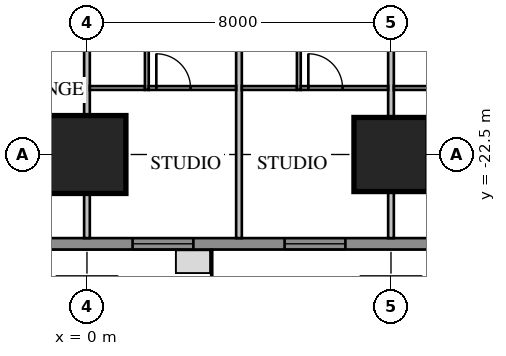
"""IFC4 building model, lengths in metres.
Left out: names, types, materials, properties, quantities, classifications, styles, units other than length and angle.
Written with IfcOpenShell. Run it as: python <this file> out.ifc"""

import sys

from ifc_helpers import new_model, si_unit, direction, frame, frame_2d, origin, origin_2d, place, context, subcontext, project, spatial, rectangle, extrude, element, fill, save


model = new_model("IFC4")
c1 = context("Model", 3, precision=1e-05, world=origin(), true_north=direction((0.0, 1.0)))
c2 = subcontext(c1, "Body", "Model", "MODEL_VIEW")
j1 = project(units=[si_unit("LENGTHUNIT", "METRE"), si_unit("PLANEANGLEUNIT", "RADIAN")], contexts=[c1])
p1 = place(None, origin())
s1 = spatial("IfcSite", under=j1, at=p1, CompositionType="ELEMENT")
p2 = place(p1, origin())
s2 = spatial("IfcBuilding", under=s1, at=p2, CompositionType="ELEMENT")
p3 = place(p2, frame((0.0, 0.0, 27.55)))
s3 = spatial("IfcBuildingStorey", under=s2, at=p3, CompositionType="ELEMENT", Elevation=27.55)
p4 = place(p3, frame((0.0, -22.5, 0.0), z_axis=(0.0, 0.0, 1.0), x_axis=(1.0, 0.0, 0.0)))
e1 = element("IfcColumn", 1, at=p4, inside=s3, PredefinedType="COLUMN", context=c2, shape_type="SweptSolid", body=[
    extrude(rectangle(XDim=2.05, YDim=2.05, at=origin_2d()), origin(), (0.0, 0.0, 1.0), 3.85),
])
p5 = place(p3, frame((8.0, -22.5, 0.0), z_axis=(0.0, 0.0, 1.0), x_axis=(1.0, 0.0, 0.0)))
e2 = element("IfcColumn", 2, at=p5, inside=s3, PredefinedType="COLUMN", context=c2, shape_type="SweptSolid", body=[
    extrude(rectangle(XDim=1.95, YDim=1.95, at=origin_2d()), origin(), (0.0, 0.0, 1.0), 3.85),
])
p6 = place(p3, frame((-16.0, -24.85, 0.0), z_axis=(0.0, 0.0, 1.0), x_axis=(1.0, 0.0, 0.0)))
e3 = element("IfcWall", 3, at=p6, inside=s3, PredefinedType="SOLIDWALL", context=c2, shape_type="SweptSolid", body=[
    extrude(rectangle(XDim=32.0, YDim=0.3, at=frame_2d((16.0, 0.0))), origin(), (0.0, 0.0, 1.0), 3.65),
])
p7 = place(p6, frame((1.2, 0.0, 0.75)))
e4 = element("IfcOpeningElement", 4, at=p7, cuts=e3, PredefinedType="OPENING", context=c2, shape_type="SweptSolid", body=[
    extrude(rectangle(XDim=1.6, YDim=1.8, at=frame_2d((0.8, 0.9))), frame((0.0, 0.17, 0.0), z_axis=(0.0, -1.0, 0.0), x_axis=(1.0, 0.0, 0.0)), (0.0, 0.0, 1.0), 0.34),
])
p8 = place(p6, frame((5.2, 0.0, 0.75)))
e5 = element("IfcOpeningElement", 5, at=p8, cuts=e3, PredefinedType="OPENING", context=c2, shape_type="SweptSolid", body=[
    extrude(rectangle(XDim=1.6, YDim=1.8, at=frame_2d((0.8, 0.9))), frame((0.0, 0.17, 0.0), z_axis=(0.0, -1.0, 0.0), x_axis=(1.0, 0.0, 0.0)), (0.0, 0.0, 1.0), 0.34),
])
p9 = place(p6, frame((17.2, 0.0, 0.75)))
e6 = element("IfcOpeningElement", 6, at=p9, cuts=e3, PredefinedType="OPENING", context=c2, shape_type="SweptSolid", body=[
    extrude(rectangle(XDim=1.6, YDim=1.8, at=frame_2d((0.8, 0.9))), frame((0.0, 0.17, 0.0), z_axis=(0.0, -1.0, 0.0), x_axis=(1.0, 0.0, 0.0)), (0.0, 0.0, 1.0), 0.34),
])
p10 = place(p6, frame((21.2, 0.0, 0.75)))
e7 = element("IfcOpeningElement", 7, at=p10, cuts=e3, PredefinedType="OPENING", context=c2, shape_type="SweptSolid", body=[
    extrude(rectangle(XDim=1.6, YDim=1.8, at=frame_2d((0.8, 0.9))), frame((0.0, 0.17, 0.0), z_axis=(0.0, -1.0, 0.0), x_axis=(1.0, 0.0, 0.0)), (0.0, 0.0, 1.0), 0.34),
])
p11 = place(p6, frame((25.2, 0.0, 0.75)))
e8 = element("IfcOpeningElement", 8, at=p11, cuts=e3, PredefinedType="OPENING", context=c2, shape_type="SweptSolid", body=[
    extrude(rectangle(XDim=1.6, YDim=1.8, at=frame_2d((0.8, 0.9))), frame((0.0, 0.17, 0.0), z_axis=(0.0, -1.0, 0.0), x_axis=(1.0, 0.0, 0.0)), (0.0, 0.0, 1.0), 0.34),
])
p12 = place(p6, frame((29.2, 0.0, 0.75)))
e9 = element("IfcOpeningElement", 9, at=p12, cuts=e3, PredefinedType="OPENING", context=c2, shape_type="SweptSolid", body=[
    extrude(rectangle(XDim=1.6, YDim=1.8, at=frame_2d((0.8, 0.9))), frame((0.0, 0.17, 0.0), z_axis=(0.0, -1.0, 0.0), x_axis=(1.0, 0.0, 0.0)), (0.0, 0.0, 1.0), 0.34),
])
p13 = place(p6, frame((8.8, 0.0, 0.75)))
e10 = element("IfcOpeningElement", 10, at=p13, cuts=e3, PredefinedType="OPENING", context=c2, shape_type="SweptSolid", body=[
    extrude(rectangle(XDim=2.4, YDim=1.8, at=frame_2d((1.2, 0.9))), frame((0.0, 0.17, 0.0), z_axis=(0.0, -1.0, 0.0), x_axis=(1.0, 0.0, 0.0)), (0.0, 0.0, 1.0), 0.34),
])
p14 = place(p6, frame((13.812, 0.0, 0.0)))
e11 = element("IfcOpeningElement", 11, at=p14, cuts=e3, PredefinedType="OPENING", context=c2, shape_type="SweptSolid", body=[
    extrude(rectangle(XDim=1.0, YDim=2.4, at=frame_2d((0.5, 1.2))), frame((0.0, 0.17, 0.0), z_axis=(0.0, -1.0, 0.0), x_axis=(1.0, 0.0, 0.0)), (0.0, 0.0, 1.0), 0.34),
])
p15 = place(p3, frame((0.0, -18.1, 0.0), z_axis=(0.0, 0.0, 1.0), x_axis=(0.0, -1.0, 0.0)))
e12 = element("IfcWall", 12, at=p15, inside=s3, PredefinedType="PARTITIONING", context=c2, shape_type="SweptSolid", body=[
    extrude(rectangle(XDim=6.6, YDim=0.15, at=frame_2d((3.3, 0.0))), origin(), (0.0, 0.0, 1.0), 2.809),
])
for number, where, z_axis, x_axis in (
    (13, (4.0, -18.1, 0.0), (0.0, 0.0, 1.0), (0.0, -1.0, 0.0)),
    (14, (8.0, -18.1, 0.0), (0.0, 0.0, 1.0), (0.0, -1.0, 0.0)),
):
    element("IfcWall", number, at=place(p3, frame(where, z_axis=z_axis, x_axis=x_axis)), inside=s3, PredefinedType="PARTITIONING", context=c2, shape_type="SweptSolid", body=[
        extrude(rectangle(XDim=6.6, YDim=0.15, at=frame_2d((3.3, 0.0))), origin(), (0.0, 0.0, 1.0), 3.65),
    ])
p16 = place(p3, frame((1.575, -18.1, 0.0), z_axis=(0.0, 0.0, 1.0), x_axis=(0.0, -1.0, 0.0)))
e15 = element("IfcWall", 15, at=p16, inside=s3, PredefinedType="PARTITIONING", context=c2, shape_type="SweptSolid", body=[
    extrude(rectangle(XDim=2.7, YDim=0.1, at=frame_2d((1.35, 0.0))), origin(), (0.0, 0.0, 1.0), 3.65),
])
p17 = place(p16, frame((0.55, 0.0, 0.0)))
e16 = element("IfcOpeningElement", 16, at=p17, cuts=e15, PredefinedType="OPENING", context=c2, shape_type="SweptSolid", body=[
    extrude(rectangle(XDim=0.8, YDim=2.1, at=frame_2d((0.4, 1.05))), frame((0.0, 0.07, 0.0), z_axis=(0.0, -1.0, 0.0), x_axis=(1.0, 0.0, 0.0)), (0.0, 0.0, 1.0), 0.14),
])
p18 = place(p3, frame((0.075, -20.75, 0.0), z_axis=(0.0, 0.0, 1.0), x_axis=(1.0, 0.0, 0.0)))
e17 = element("IfcWall", 17, at=p18, inside=s3, PredefinedType="PARTITIONING", context=c2, shape_type="SweptSolid", body=[
    extrude(rectangle(XDim=1.45, YDim=0.1, at=frame_2d((0.725, 0.0))), origin(), (0.0, 0.0, 1.0), 3.65),
])
p19 = place(p3, frame((5.575, -18.1, 0.0), z_axis=(0.0, 0.0, 1.0), x_axis=(0.0, -1.0, 0.0)))
e18 = element("IfcWall", 18, at=p19, inside=s3, PredefinedType="PARTITIONING", context=c2, shape_type="SweptSolid", body=[
    extrude(rectangle(XDim=2.7, YDim=0.1, at=frame_2d((1.35, 0.0))), origin(), (0.0, 0.0, 1.0), 3.65),
])
p20 = place(p19, frame((0.55, 0.0, 0.0)))
e19 = element("IfcOpeningElement", 19, at=p20, cuts=e18, PredefinedType="OPENING", context=c2, shape_type="SweptSolid", body=[
    extrude(rectangle(XDim=0.8, YDim=2.1, at=frame_2d((0.4, 1.05))), frame((0.0, 0.07, 0.0), z_axis=(0.0, -1.0, 0.0), x_axis=(1.0, 0.0, 0.0)), (0.0, 0.0, 1.0), 0.14),
])
for number, where, z_axis, x_axis in (
    (20, (4.075, -20.75, 0.0), (0.0, 0.0, 1.0), (1.0, 0.0, 0.0)),
    (21, (8.075, -20.75, 0.0), (0.0, 0.0, 1.0), (1.0, 0.0, 0.0)),
):
    element("IfcWall", number, at=place(p3, frame(where, z_axis=z_axis, x_axis=x_axis)), inside=s3, PredefinedType="PARTITIONING", context=c2, shape_type="SweptSolid", body=[
        extrude(rectangle(XDim=1.45, YDim=0.1, at=frame_2d((0.725, 0.0))), origin(), (0.0, 0.0, 1.0), 3.65),
    ])
p21 = place(p3, frame((1.625, -20.75, 0.0), z_axis=(0.0, 0.0, 1.0), x_axis=(1.0, 0.0, 0.0)))
e22 = element("IfcWall", 22, at=p21, inside=s3, PredefinedType="PARTITIONING", context=c2, shape_type="SweptSolid", body=[
    extrude(rectangle(XDim=2.3, YDim=0.1, at=frame_2d((1.15, 0.0))), origin(), (0.0, 0.0, 1.0), 3.65),
])
p22 = place(p21, frame((0.2, 0.0, 0.0)))
e23 = element("IfcOpeningElement", 23, at=p22, cuts=e22, PredefinedType="OPENING", context=c2, shape_type="SweptSolid", body=[
    extrude(rectangle(XDim=0.9, YDim=2.1, at=frame_2d((0.45, 1.05))), frame((0.0, 0.07, 0.0), z_axis=(0.0, -1.0, 0.0), x_axis=(1.0, 0.0, 0.0)), (0.0, 0.0, 1.0), 0.14),
])
p23 = place(p3, frame((5.625, -20.75, 0.0), z_axis=(0.0, 0.0, 1.0), x_axis=(1.0, 0.0, 0.0)))
e24 = element("IfcWall", 24, at=p23, inside=s3, PredefinedType="PARTITIONING", context=c2, shape_type="SweptSolid", body=[
    extrude(rectangle(XDim=2.3, YDim=0.1, at=frame_2d((1.15, 0.0))), origin(), (0.0, 0.0, 1.0), 3.65),
])
p24 = place(p23, frame((0.2, 0.0, 0.0)))
e25 = element("IfcOpeningElement", 25, at=p24, cuts=e24, PredefinedType="OPENING", context=c2, shape_type="SweptSolid", body=[
    extrude(rectangle(XDim=0.9, YDim=2.1, at=frame_2d((0.45, 1.05))), frame((0.0, 0.07, 0.0), z_axis=(0.0, -1.0, 0.0), x_axis=(1.0, 0.0, 0.0)), (0.0, 0.0, 1.0), 0.14),
])
p25 = place(p9, origin())
e26 = element("IfcWindow", 26, at=p25, inside=s3, PartitioningType="SINGLE_PANEL", PredefinedType="WINDOW", context=c2, shape_type="SweptSolid", body=[
    extrude(rectangle(XDim=1.6, YDim=1.8, at=frame_2d((0.8, 0.9))), frame((0.0, 0.03, 0.0), z_axis=(0.0, -1.0, 0.0), x_axis=(1.0, 0.0, 0.0)), (0.0, 0.0, 1.0), 0.06),
])
fill(e6, e26)
p26 = place(p10, origin())
e27 = element("IfcWindow", 27, at=p26, inside=s3, PartitioningType="SINGLE_PANEL", PredefinedType="WINDOW", context=c2, shape_type="SweptSolid", body=[
    extrude(rectangle(XDim=1.6, YDim=1.8, at=frame_2d((0.8, 0.9))), frame((0.0, 0.03, 0.0), z_axis=(0.0, -1.0, 0.0), x_axis=(1.0, 0.0, 0.0)), (0.0, 0.0, 1.0), 0.06),
])
fill(e7, e27)
p27 = place(p22, origin())
e28 = element("IfcDoor", 28, at=p27, inside=s3, OperationType="SINGLE_SWING_LEFT", PredefinedType="DOOR", context=c2, shape_type="SweptSolid", body=[
    extrude(rectangle(XDim=0.9, YDim=2.1, at=frame_2d((0.45, 1.05))), frame((0.0, 0.025, 0.0), z_axis=(0.0, -1.0, 0.0), x_axis=(1.0, 0.0, 0.0)), (0.0, 0.0, 1.0), 0.05),
])
fill(e23, e28)
p28 = place(p24, origin())
e29 = element("IfcDoor", 29, at=p28, inside=s3, OperationType="SINGLE_SWING_LEFT", PredefinedType="DOOR", context=c2, shape_type="SweptSolid", body=[
    extrude(rectangle(XDim=0.9, YDim=2.1, at=frame_2d((0.45, 1.05))), frame((0.0, 0.025, 0.0), z_axis=(0.0, -1.0, 0.0), x_axis=(1.0, 0.0, 0.0)), (0.0, 0.0, 1.0), 0.05),
])
fill(e25, e29)
save(model, sys.argv[1])
